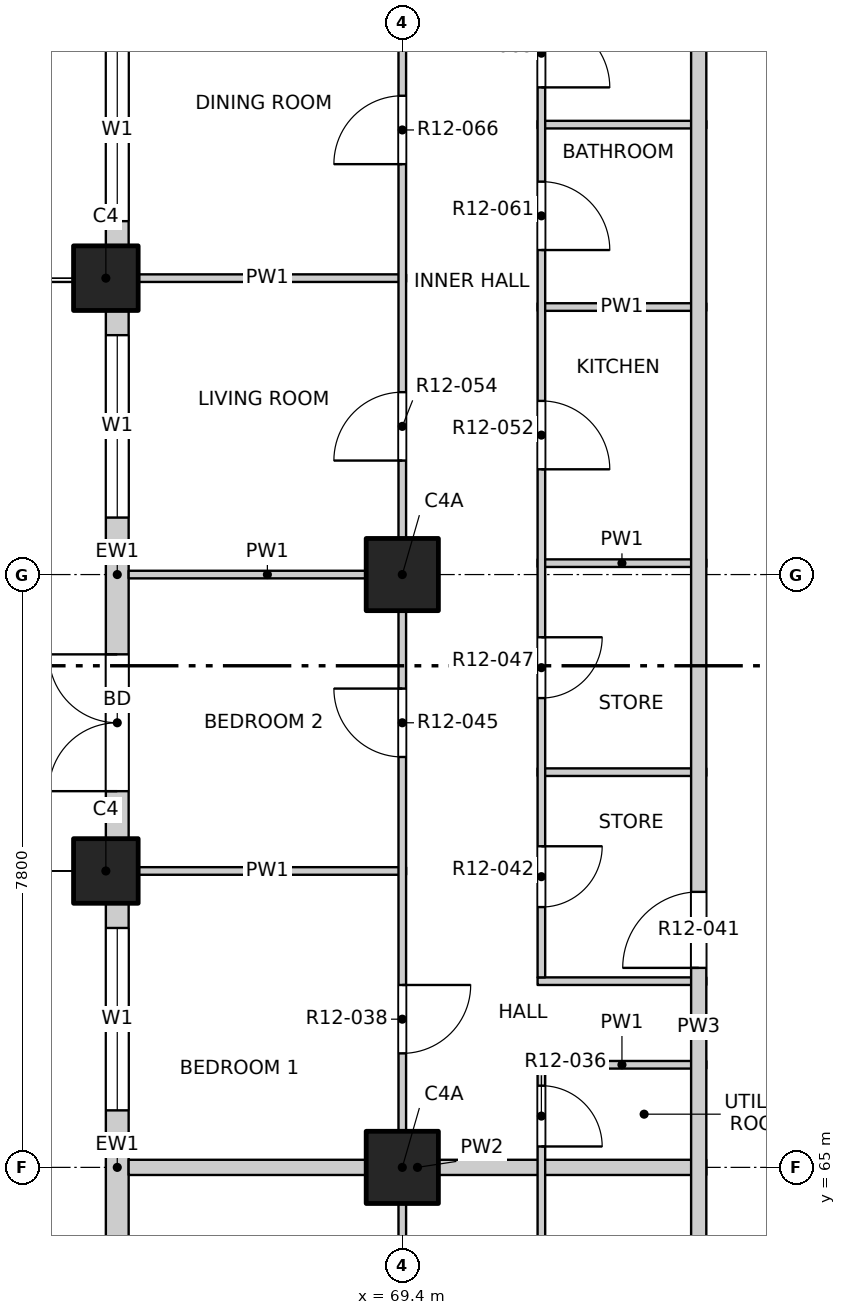
"""IFC4 building model, lengths in metres.
Left out: names, types, materials, properties, quantities, classifications, styles, units other than length and angle.
Written with IfcOpenShell. Run it as: python <this file> out.ifc"""

import sys

from ifc_helpers import new_model, si_unit, direction, frame, frame_2d, origin, origin_2d, place, context, subcontext, project, spatial, rectangle, extrude, element, fill, save


model = new_model("IFC4")
c1 = context("Model", 3, precision=1e-05, world=origin(), true_north=direction((0.0, 1.0)))
c2 = subcontext(c1, "Body", "Model", "MODEL_VIEW")
j1 = project(units=[si_unit("LENGTHUNIT", "METRE"), si_unit("PLANEANGLEUNIT", "RADIAN")], contexts=[c1])
p1 = place(None, origin())
s1 = spatial("IfcSite", under=j1, at=p1, CompositionType="ELEMENT")
p2 = place(p1, origin())
s2 = spatial("IfcBuilding", under=s1, at=p2, CompositionType="ELEMENT")
p3 = place(p2, frame((0.0, 0.0, 137.3)))
s3 = spatial("IfcBuildingStorey", under=s2, at=p3, CompositionType="ELEMENT", Elevation=137.3)
for number, where, z_axis, x_axis in (
    (1, (65.5, 68.9, -0.25), (0.0, 0.0, 1.0), (1.0, 0.0, 0.0)),
    (2, (65.5, 76.7, -0.25), (0.0, 0.0, 1.0), (1.0, 0.0, 0.0)),
):
    element("IfcColumn", number, at=place(p3, frame(where, z_axis=z_axis, x_axis=x_axis)), inside=s3, PredefinedType="COLUMN", context=c2, shape_type="SweptSolid", body=[
        extrude(rectangle(XDim=0.85, YDim=0.85, at=origin_2d()), origin(), (0.0, 0.0, 1.0), 3.4),
    ])
for number, where, z_axis, x_axis in (
    (3, (69.4, 65.0, -0.25), (0.0, 0.0, 1.0), (1.0, 0.0, 0.0)),
    (4, (69.4, 72.8, -0.25), (0.0, 0.0, 1.0), (1.0, 0.0, 0.0)),
):
    element("IfcColumn", number, at=place(p3, frame(where, z_axis=z_axis, x_axis=x_axis)), inside=s3, PredefinedType="COLUMN", context=c2, shape_type="SweptSolid", body=[
        extrude(rectangle(XDim=0.95, YDim=0.95, at=origin_2d()), origin(), (0.0, 0.0, 1.0), 3.4),
    ])
p4 = place(p3, frame((65.65, 61.525, 0.0), z_axis=(0.0, 0.0, 1.0), x_axis=(0.0, 1.0, 0.0)))
e5 = element("IfcWall", 5, at=p4, inside=s3, PredefinedType="SOLIDWALL", context=c2, shape_type="SweptSolid", body=[
    extrude(rectangle(XDim=6.95, YDim=0.3, at=frame_2d((3.475, 0.0))), origin(), (0.0, 0.0, 1.0), 2.7),
])
p5 = place(p4, frame((0.625, 0.0, 0.0)))
e6 = element("IfcOpeningElement", 6, at=p5, cuts=e5, PredefinedType="OPENING", context=c2, shape_type="SweptSolid", body=[
    extrude(rectangle(XDim=1.8, YDim=2.4, at=frame_2d((0.9, 1.2))), frame((0.0, 0.16, 0.0), z_axis=(0.0, -1.0, 0.0), x_axis=(1.0, 0.0, 0.0)), (0.0, 0.0, 1.0), 0.32),
])
p6 = place(p4, frame((4.225, 0.0, 0.9)))
e7 = element("IfcOpeningElement", 7, at=p6, cuts=e5, PredefinedType="OPENING", context=c2, shape_type="SweptSolid", body=[
    extrude(rectangle(XDim=2.4, YDim=1.8, at=frame_2d((1.2, 0.9))), frame((0.0, 0.16, 0.0), z_axis=(0.0, -1.0, 0.0), x_axis=(1.0, 0.0, 0.0)), (0.0, 0.0, 1.0), 0.32),
])
p7 = place(p3, frame((65.65, 69.325, 0.0), z_axis=(0.0, 0.0, 1.0), x_axis=(0.0, 1.0, 0.0)))
e8 = element("IfcWall", 8, at=p7, inside=s3, PredefinedType="SOLIDWALL", context=c2, shape_type="SweptSolid", body=[
    extrude(rectangle(XDim=6.95, YDim=0.3, at=frame_2d((3.475, 0.0))), origin(), (0.0, 0.0, 1.0), 2.7),
])
p8 = place(p7, frame((0.625, 0.0, 0.0)))
e9 = element("IfcOpeningElement", 9, at=p8, cuts=e8, PredefinedType="OPENING", context=c2, shape_type="SweptSolid", body=[
    extrude(rectangle(XDim=1.8, YDim=2.4, at=frame_2d((0.9, 1.2))), frame((0.0, 0.16, 0.0), z_axis=(0.0, -1.0, 0.0), x_axis=(1.0, 0.0, 0.0)), (0.0, 0.0, 1.0), 0.32),
])
p9 = place(p7, frame((4.225, 0.0, 0.9)))
e10 = element("IfcOpeningElement", 10, at=p9, cuts=e8, PredefinedType="OPENING", context=c2, shape_type="SweptSolid", body=[
    extrude(rectangle(XDim=2.4, YDim=1.8, at=frame_2d((1.2, 0.9))), frame((0.0, 0.16, 0.0), z_axis=(0.0, -1.0, 0.0), x_axis=(1.0, 0.0, 0.0)), (0.0, 0.0, 1.0), 0.32),
])
p10 = place(p3, frame((65.65, 77.125, 0.0), z_axis=(0.0, 0.0, 1.0), x_axis=(0.0, 1.0, 0.0)))
e11 = element("IfcWall", 11, at=p10, inside=s3, PredefinedType="SOLIDWALL", context=c2, shape_type="SweptSolid", body=[
    extrude(rectangle(XDim=3.475, YDim=0.3, at=frame_2d((1.738, 0.0))), origin(), (0.0, 0.0, 1.0), 2.7),
])
p11 = place(p10, frame((0.325, 0.0, 0.9)))
e12 = element("IfcOpeningElement", 12, at=p11, cuts=e11, PredefinedType="OPENING", context=c2, shape_type="SweptSolid", body=[
    extrude(rectangle(XDim=2.4, YDim=1.8, at=frame_2d((1.2, 0.9))), frame((0.0, 0.16, 0.0), z_axis=(0.0, -1.0, 0.0), x_axis=(1.0, 0.0, 0.0)), (0.0, 0.0, 1.0), 0.32),
])
p12 = place(p3, frame((65.8, 65.0, 0.0), z_axis=(0.0, 0.0, 1.0), x_axis=(1.0, 0.0, 0.0)))
e13 = element("IfcWall", 13, at=p12, inside=s3, PredefinedType="PARTITIONING", context=c2, shape_type="SweptSolid", body=[
    extrude(rectangle(XDim=7.6, YDim=0.2, at=frame_2d((3.8, 0.0))), origin(), (0.0, 0.0, 1.0), 3.15),
])
for number, where, z_axis, x_axis in (
    (14, (71.18, 66.35, 0.0), (0.0, 0.0, 1.0), (1.0, 0.0, 0.0)),
    (15, (71.18, 67.45, 0.0), (0.0, 0.0, 1.0), (1.0, 0.0, 0.0)),
):
    element("IfcWall", number, at=place(p3, frame(where, z_axis=z_axis, x_axis=x_axis)), inside=s3, PredefinedType="PARTITIONING", context=c2, shape_type="SweptSolid", body=[
        extrude(rectangle(XDim=2.22, YDim=0.1, at=frame_2d((1.11, 0.0))), origin(), (0.0, 0.0, 1.0), 3.15),
    ])
p13 = place(p3, frame((65.8, 68.9, 0.0), z_axis=(0.0, 0.0, 1.0), x_axis=(1.0, 0.0, 0.0)))
e16 = element("IfcWall", 16, at=p13, inside=s3, PredefinedType="PARTITIONING", context=c2, shape_type="SweptSolid", body=[
    extrude(rectangle(XDim=3.65, YDim=0.1, at=frame_2d((1.825, 0.0))), origin(), (0.0, 0.0, 1.0), 2.55),
])
p14 = place(p3, frame((71.18, 70.2, 0.0), z_axis=(0.0, 0.0, 1.0), x_axis=(1.0, 0.0, 0.0)))
e17 = element("IfcWall", 17, at=p14, inside=s3, PredefinedType="PARTITIONING", context=c2, shape_type="SweptSolid", body=[
    extrude(rectangle(XDim=2.22, YDim=0.1, at=frame_2d((1.11, 0.0))), origin(), (0.0, 0.0, 1.0), 3.15),
])
p15 = place(p3, frame((65.8, 72.8, 0.0), z_axis=(0.0, 0.0, 1.0), x_axis=(1.0, 0.0, 0.0)))
e18 = element("IfcWall", 18, at=p15, inside=s3, PredefinedType="PARTITIONING", context=c2, shape_type="SweptSolid", body=[
    extrude(rectangle(XDim=3.65, YDim=0.1, at=frame_2d((1.825, 0.0))), origin(), (0.0, 0.0, 1.0), 3.15),
])
for number, where, z_axis, x_axis in (
    (19, (71.18, 72.95, 0.0), (0.0, 0.0, 1.0), (1.0, 0.0, 0.0)),
    (20, (71.18, 76.32, 0.0), (0.0, 0.0, 1.0), (1.0, 0.0, 0.0)),
):
    element("IfcWall", number, at=place(p3, frame(where, z_axis=z_axis, x_axis=x_axis)), inside=s3, PredefinedType="PARTITIONING", context=c2, shape_type="SweptSolid", body=[
        extrude(rectangle(XDim=2.22, YDim=0.1, at=frame_2d((1.11, 0.0))), origin(), (0.0, 0.0, 1.0), 3.15),
    ])
p16 = place(p3, frame((65.8, 76.7, 0.0), z_axis=(0.0, 0.0, 1.0), x_axis=(1.0, 0.0, 0.0)))
e21 = element("IfcWall", 21, at=p16, inside=s3, PredefinedType="PARTITIONING", context=c2, shape_type="SweptSolid", body=[
    extrude(rectangle(XDim=3.65, YDim=0.1, at=frame_2d((1.825, 0.0))), origin(), (0.0, 0.0, 1.0), 2.55),
])
p17 = place(p3, frame((71.18, 78.72, 0.0), z_axis=(0.0, 0.0, 1.0), x_axis=(1.0, 0.0, 0.0)))
e22 = element("IfcWall", 22, at=p17, inside=s3, PredefinedType="PARTITIONING", context=c2, shape_type="SweptSolid", body=[
    extrude(rectangle(XDim=2.22, YDim=0.1, at=frame_2d((1.11, 0.0))), origin(), (0.0, 0.0, 1.0), 3.15),
])
p18 = place(p3, frame((69.4, 45.8, 0.0), z_axis=(0.0, 0.0, 1.0), x_axis=(0.0, 1.0, 0.0)))
e23 = element("IfcWall", 23, at=p18, inside=s3, PredefinedType="PARTITIONING", context=c2, shape_type="SweptSolid", body=[
    extrude(rectangle(XDim=38.4, YDim=0.1, at=frame_2d((19.2, 0.0))), origin(), (0.0, 0.0, 1.0), 3.15),
])
p19 = place(p18, frame((1.05, 0.0, 0.0)))
e24 = element("IfcOpeningElement", 24, at=p19, cuts=e23, PredefinedType="OPENING", context=c2, shape_type="SweptSolid", body=[
    extrude(rectangle(XDim=1.2, YDim=2.1, at=frame_2d((0.6, 1.05))), frame((0.0, 0.06, 0.0), z_axis=(0.0, -1.0, 0.0), x_axis=(1.0, 0.0, 0.0)), (0.0, 0.0, 1.0), 0.12),
])
p20 = place(p18, frame((5.1, 0.0, 0.0)))
e25 = element("IfcOpeningElement", 25, at=p20, cuts=e23, PredefinedType="OPENING", context=c2, shape_type="SweptSolid", body=[
    extrude(rectangle(XDim=0.9, YDim=2.1, at=frame_2d((0.45, 1.05))), frame((0.0, 0.06, 0.0), z_axis=(0.0, -1.0, 0.0), x_axis=(1.0, 0.0, 0.0)), (0.0, 0.0, 1.0), 0.12),
])
p21 = place(p18, frame((9.0, 0.0, 0.0)))
e26 = element("IfcOpeningElement", 26, at=p21, cuts=e23, PredefinedType="OPENING", context=c2, shape_type="SweptSolid", body=[
    extrude(rectangle(XDim=0.9, YDim=2.1, at=frame_2d((0.45, 1.05))), frame((0.0, 0.06, 0.0), z_axis=(0.0, -1.0, 0.0), x_axis=(1.0, 0.0, 0.0)), (0.0, 0.0, 1.0), 0.12),
])
p22 = place(p18, frame((12.9, 0.0, 0.0)))
e27 = element("IfcOpeningElement", 27, at=p22, cuts=e23, PredefinedType="OPENING", context=c2, shape_type="SweptSolid", body=[
    extrude(rectangle(XDim=0.9, YDim=2.1, at=frame_2d((0.45, 1.05))), frame((0.0, 0.06, 0.0), z_axis=(0.0, -1.0, 0.0), x_axis=(1.0, 0.0, 0.0)), (0.0, 0.0, 1.0), 0.12),
])
p23 = place(p18, frame((16.8, 0.0, 0.0)))
e28 = element("IfcOpeningElement", 28, at=p23, cuts=e23, PredefinedType="OPENING", context=c2, shape_type="SweptSolid", body=[
    extrude(rectangle(XDim=0.9, YDim=2.1, at=frame_2d((0.45, 1.05))), frame((0.0, 0.06, 0.0), z_axis=(0.0, -1.0, 0.0), x_axis=(1.0, 0.0, 0.0)), (0.0, 0.0, 1.0), 0.12),
])
p24 = place(p18, frame((20.7, 0.0, 0.0)))
e29 = element("IfcOpeningElement", 29, at=p24, cuts=e23, PredefinedType="OPENING", context=c2, shape_type="SweptSolid", body=[
    extrude(rectangle(XDim=0.9, YDim=2.1, at=frame_2d((0.45, 1.05))), frame((0.0, 0.06, 0.0), z_axis=(0.0, -1.0, 0.0), x_axis=(1.0, 0.0, 0.0)), (0.0, 0.0, 1.0), 0.12),
])
p25 = place(p18, frame((24.6, 0.0, 0.0)))
e30 = element("IfcOpeningElement", 30, at=p25, cuts=e23, PredefinedType="OPENING", context=c2, shape_type="SweptSolid", body=[
    extrude(rectangle(XDim=0.9, YDim=2.1, at=frame_2d((0.45, 1.05))), frame((0.0, 0.06, 0.0), z_axis=(0.0, -1.0, 0.0), x_axis=(1.0, 0.0, 0.0)), (0.0, 0.0, 1.0), 0.12),
])
p26 = place(p18, frame((28.5, 0.0, 0.0)))
e31 = element("IfcOpeningElement", 31, at=p26, cuts=e23, PredefinedType="OPENING", context=c2, shape_type="SweptSolid", body=[
    extrude(rectangle(XDim=0.9, YDim=2.1, at=frame_2d((0.45, 1.05))), frame((0.0, 0.06, 0.0), z_axis=(0.0, -1.0, 0.0), x_axis=(1.0, 0.0, 0.0)), (0.0, 0.0, 1.0), 0.12),
])
p27 = place(p18, frame((32.4, 0.0, 0.0)))
e32 = element("IfcOpeningElement", 32, at=p27, cuts=e23, PredefinedType="OPENING", context=c2, shape_type="SweptSolid", body=[
    extrude(rectangle(XDim=0.9, YDim=2.1, at=frame_2d((0.45, 1.05))), frame((0.0, 0.06, 0.0), z_axis=(0.0, -1.0, 0.0), x_axis=(1.0, 0.0, 0.0)), (0.0, 0.0, 1.0), 0.12),
])
p28 = place(p18, frame((36.15, 0.0, 0.0)))
e33 = element("IfcOpeningElement", 33, at=p28, cuts=e23, PredefinedType="OPENING", context=c2, shape_type="SweptSolid", body=[
    extrude(rectangle(XDim=1.2, YDim=2.1, at=frame_2d((0.6, 1.05))), frame((0.0, 0.06, 0.0), z_axis=(0.0, -1.0, 0.0), x_axis=(1.0, 0.0, 0.0)), (0.0, 0.0, 1.0), 0.12),
])
p29 = place(p3, frame((71.23, 56.35, 0.0), z_axis=(0.0, 0.0, 1.0), x_axis=(0.0, 1.0, 0.0)))
e34 = element("IfcWall", 34, at=p29, inside=s3, PredefinedType="PARTITIONING", context=c2, shape_type="SweptSolid", body=[
    extrude(rectangle(XDim=9.95, YDim=0.1, at=frame_2d((4.975, 0.0))), origin(), (0.0, 0.0, 1.0), 3.15),
])
p30 = place(p29, frame((0.99, 0.0, 0.0)))
e35 = element("IfcOpeningElement", 35, at=p30, cuts=e34, PredefinedType="OPENING", context=c2, shape_type="SweptSolid", body=[
    extrude(rectangle(XDim=0.8, YDim=2.1, at=frame_2d((0.4, 1.05))), frame((0.0, 0.06, 0.0), z_axis=(0.0, -1.0, 0.0), x_axis=(1.0, 0.0, 0.0)), (0.0, 0.0, 1.0), 0.12),
])
p31 = place(p29, frame((3.73, 0.0, 0.0)))
e36 = element("IfcOpeningElement", 36, at=p31, cuts=e34, PredefinedType="OPENING", context=c2, shape_type="SweptSolid", body=[
    extrude(rectangle(XDim=0.8, YDim=2.1, at=frame_2d((0.4, 1.05))), frame((0.0, 0.06, 0.0), z_axis=(0.0, -1.0, 0.0), x_axis=(1.0, 0.0, 0.0)), (0.0, 0.0, 1.0), 0.12),
])
p32 = place(p29, frame((6.59, 0.0, 0.0)))
e37 = element("IfcOpeningElement", 37, at=p32, cuts=e34, PredefinedType="OPENING", context=c2, shape_type="SweptSolid", body=[
    extrude(rectangle(XDim=0.9, YDim=2.1, at=frame_2d((0.45, 1.05))), frame((0.0, 0.06, 0.0), z_axis=(0.0, -1.0, 0.0), x_axis=(1.0, 0.0, 0.0)), (0.0, 0.0, 1.0), 0.12),
])
p33 = place(p29, frame((8.925, 0.0, 0.0)))
e38 = element("IfcOpeningElement", 38, at=p33, cuts=e34, PredefinedType="OPENING", context=c2, shape_type="SweptSolid", body=[
    extrude(rectangle(XDim=0.8, YDim=2.1, at=frame_2d((0.4, 1.05))), frame((0.0, 0.06, 0.0), z_axis=(0.0, -1.0, 0.0), x_axis=(1.0, 0.0, 0.0)), (0.0, 0.0, 1.0), 0.12),
])
p34 = place(p3, frame((71.23, 67.5, 0.0), z_axis=(0.0, 0.0, 1.0), x_axis=(0.0, 1.0, 0.0)))
e39 = element("IfcWall", 39, at=p34, inside=s3, PredefinedType="PARTITIONING", context=c2, shape_type="SweptSolid", body=[
    extrude(rectangle(XDim=13.05, YDim=0.1, at=frame_2d((6.525, 0.0))), origin(), (0.0, 0.0, 1.0), 3.15),
])
p35 = place(p34, frame((0.925, 0.0, 0.0)))
e40 = element("IfcOpeningElement", 40, at=p35, cuts=e39, PredefinedType="OPENING", context=c2, shape_type="SweptSolid", body=[
    extrude(rectangle(XDim=0.8, YDim=2.1, at=frame_2d((0.4, 1.05))), frame((0.0, 0.06, 0.0), z_axis=(0.0, -1.0, 0.0), x_axis=(1.0, 0.0, 0.0)), (0.0, 0.0, 1.0), 0.12),
])
p36 = place(p34, frame((3.675, 0.0, 0.0)))
e41 = element("IfcOpeningElement", 41, at=p36, cuts=e39, PredefinedType="OPENING", context=c2, shape_type="SweptSolid", body=[
    extrude(rectangle(XDim=0.8, YDim=2.1, at=frame_2d((0.4, 1.05))), frame((0.0, 0.06, 0.0), z_axis=(0.0, -1.0, 0.0), x_axis=(1.0, 0.0, 0.0)), (0.0, 0.0, 1.0), 0.12),
])
p37 = place(p34, frame((6.685, 0.0, 0.0)))
e42 = element("IfcOpeningElement", 42, at=p37, cuts=e39, PredefinedType="OPENING", context=c2, shape_type="SweptSolid", body=[
    extrude(rectangle(XDim=0.9, YDim=2.1, at=frame_2d((0.45, 1.05))), frame((0.0, 0.06, 0.0), z_axis=(0.0, -1.0, 0.0), x_axis=(1.0, 0.0, 0.0)), (0.0, 0.0, 1.0), 0.12),
])
p38 = place(p34, frame((9.57, 0.0, 0.0)))
e43 = element("IfcOpeningElement", 43, at=p38, cuts=e39, PredefinedType="OPENING", context=c2, shape_type="SweptSolid", body=[
    extrude(rectangle(XDim=0.9, YDim=2.1, at=frame_2d((0.45, 1.05))), frame((0.0, 0.06, 0.0), z_axis=(0.0, -1.0, 0.0), x_axis=(1.0, 0.0, 0.0)), (0.0, 0.0, 1.0), 0.12),
])
p39 = place(p34, frame((11.71, 0.0, 0.0)))
e44 = element("IfcOpeningElement", 44, at=p39, cuts=e39, PredefinedType="OPENING", context=c2, shape_type="SweptSolid", body=[
    extrude(rectangle(XDim=0.9, YDim=2.1, at=frame_2d((0.45, 1.05))), frame((0.0, 0.06, 0.0), z_axis=(0.0, -1.0, 0.0), x_axis=(1.0, 0.0, 0.0)), (0.0, 0.0, 1.0), 0.12),
])
p40 = place(p3, frame((73.3, 49.5, 0.0), z_axis=(0.0, 0.0, 1.0), x_axis=(0.0, 1.0, 0.0)))
e45 = element("IfcWall", 45, at=p40, inside=s3, PredefinedType="PARTITIONING", context=c2, shape_type="SweptSolid", body=[
    extrude(rectangle(XDim=34.7, YDim=0.2, at=frame_2d((17.35, 0.0))), origin(), (0.0, 0.0, 1.0), 3.15),
])
p41 = place(p40, frame((6.975, 0.0, 0.0)))
e46 = element("IfcOpeningElement", 46, at=p41, cuts=e45, PredefinedType="OPENING", context=c2, shape_type="SweptSolid", body=[
    extrude(rectangle(XDim=1.0, YDim=2.1, at=frame_2d((0.5, 1.05))), frame((0.0, 0.11, 0.0), z_axis=(0.0, -1.0, 0.0), x_axis=(1.0, 0.0, 0.0)), (0.0, 0.0, 1.0), 0.22),
])
p42 = place(p40, frame((18.125, 0.0, 0.0)))
e47 = element("IfcOpeningElement", 47, at=p42, cuts=e45, PredefinedType="OPENING", context=c2, shape_type="SweptSolid", body=[
    extrude(rectangle(XDim=1.0, YDim=2.1, at=frame_2d((0.5, 1.05))), frame((0.0, 0.11, 0.0), z_axis=(0.0, -1.0, 0.0), x_axis=(1.0, 0.0, 0.0)), (0.0, 0.0, 1.0), 0.22),
])
p43 = place(p6, origin())
e48 = element("IfcWindow", 48, at=p43, inside=s3, PartitioningType="DOUBLE_PANEL_VERTICAL", PredefinedType="WINDOW", context=c2, shape_type="SweptSolid", body=[
    extrude(rectangle(XDim=2.4, YDim=1.8, at=frame_2d((1.2, 0.9))), frame((0.0, 0.03, 0.0), z_axis=(0.0, -1.0, 0.0), x_axis=(1.0, 0.0, 0.0)), (0.0, 0.0, 1.0), 0.06),
])
fill(e7, e48)
p44 = place(p8, origin())
e49 = element("IfcDoor", 49, at=p44, inside=s3, OperationType="DOUBLE_DOOR_SINGLE_SWING", PredefinedType="DOOR", context=c2, shape_type="SweptSolid", body=[
    extrude(rectangle(XDim=1.8, YDim=2.4, at=frame_2d((0.9, 1.2))), frame((0.0, 0.025, 0.0), z_axis=(0.0, -1.0, 0.0), x_axis=(1.0, 0.0, 0.0)), (0.0, 0.0, 1.0), 0.05),
])
fill(e9, e49)
p45 = place(p9, origin())
e50 = element("IfcWindow", 50, at=p45, inside=s3, PartitioningType="DOUBLE_PANEL_VERTICAL", PredefinedType="WINDOW", context=c2, shape_type="SweptSolid", body=[
    extrude(rectangle(XDim=2.4, YDim=1.8, at=frame_2d((1.2, 0.9))), frame((0.0, 0.03, 0.0), z_axis=(0.0, -1.0, 0.0), x_axis=(1.0, 0.0, 0.0)), (0.0, 0.0, 1.0), 0.06),
])
fill(e10, e50)
p46 = place(p11, origin())
e51 = element("IfcWindow", 51, at=p46, inside=s3, PartitioningType="DOUBLE_PANEL_VERTICAL", PredefinedType="WINDOW", context=c2, shape_type="SweptSolid", body=[
    extrude(rectangle(XDim=2.4, YDim=1.8, at=frame_2d((1.2, 0.9))), frame((0.0, 0.03, 0.0), z_axis=(0.0, -1.0, 0.0), x_axis=(1.0, 0.0, 0.0)), (0.0, 0.0, 1.0), 0.06),
])
fill(e12, e51)
p47 = place(p33, origin())
e52 = element("IfcDoor", 52, at=p47, inside=s3, OperationType="SINGLE_SWING_RIGHT", PredefinedType="DOOR", context=c2, shape_type="SweptSolid", body=[
    extrude(rectangle(XDim=0.8, YDim=2.1, at=frame_2d((0.4, 1.05))), frame((0.0, 0.025, 0.0), z_axis=(0.0, -1.0, 0.0), x_axis=(1.0, 0.0, 0.0)), (0.0, 0.0, 1.0), 0.05),
])
fill(e38, e52)
p48 = place(p24, origin())
e53 = element("IfcDoor", 53, at=p48, inside=s3, OperationType="SINGLE_SWING_LEFT", PredefinedType="DOOR", context=c2, shape_type="SweptSolid", body=[
    extrude(rectangle(XDim=0.9, YDim=2.1, at=frame_2d((0.45, 1.05))), frame((0.0, 0.025, 0.0), z_axis=(0.0, -1.0, 0.0), x_axis=(1.0, 0.0, 0.0)), (0.0, 0.0, 1.0), 0.05),
])
fill(e29, e53)
p49 = place(p42, origin())
e54 = element("IfcDoor", 54, at=p49, inside=s3, OperationType="SINGLE_SWING_RIGHT", PredefinedType="DOOR", context=c2, shape_type="SweptSolid", body=[
    extrude(rectangle(XDim=1.0, YDim=2.1, at=frame_2d((0.5, 1.05))), frame((0.0, 0.025, 0.0), z_axis=(0.0, -1.0, 0.0), x_axis=(1.0, 0.0, 0.0)), (0.0, 0.0, 1.0), 0.05),
])
fill(e47, e54)
p50 = place(p35, origin())
e55 = element("IfcDoor", 55, at=p50, inside=s3, OperationType="SINGLE_SWING_LEFT", PredefinedType="DOOR", context=c2, shape_type="SweptSolid", body=[
    extrude(rectangle(XDim=0.8, YDim=2.1, at=frame_2d((0.4, 1.05))), frame((0.0, 0.025, 0.0), z_axis=(0.0, -1.0, 0.0), x_axis=(1.0, 0.0, 0.0)), (0.0, 0.0, 1.0), 0.05),
])
fill(e40, e55)
p51 = place(p25, origin())
e56 = element("IfcDoor", 56, at=p51, inside=s3, OperationType="SINGLE_SWING_RIGHT", PredefinedType="DOOR", context=c2, shape_type="SweptSolid", body=[
    extrude(rectangle(XDim=0.9, YDim=2.1, at=frame_2d((0.45, 1.05))), frame((0.0, 0.025, 0.0), z_axis=(0.0, -1.0, 0.0), x_axis=(1.0, 0.0, 0.0)), (0.0, 0.0, 1.0), 0.05),
])
fill(e30, e56)
p52 = place(p36, origin())
e57 = element("IfcDoor", 57, at=p52, inside=s3, OperationType="SINGLE_SWING_LEFT", PredefinedType="DOOR", context=c2, shape_type="SweptSolid", body=[
    extrude(rectangle(XDim=0.8, YDim=2.1, at=frame_2d((0.4, 1.05))), frame((0.0, 0.025, 0.0), z_axis=(0.0, -1.0, 0.0), x_axis=(1.0, 0.0, 0.0)), (0.0, 0.0, 1.0), 0.05),
])
fill(e41, e57)
p53 = place(p37, origin())
e58 = element("IfcDoor", 58, at=p53, inside=s3, OperationType="SINGLE_SWING_RIGHT", PredefinedType="DOOR", context=c2, shape_type="SweptSolid", body=[
    extrude(rectangle(XDim=0.9, YDim=2.1, at=frame_2d((0.45, 1.05))), frame((0.0, 0.025, 0.0), z_axis=(0.0, -1.0, 0.0), x_axis=(1.0, 0.0, 0.0)), (0.0, 0.0, 1.0), 0.05),
])
fill(e42, e58)
p54 = place(p26, origin())
e59 = element("IfcDoor", 59, at=p54, inside=s3, OperationType="SINGLE_SWING_LEFT", PredefinedType="DOOR", context=c2, shape_type="SweptSolid", body=[
    extrude(rectangle(XDim=0.9, YDim=2.1, at=frame_2d((0.45, 1.05))), frame((0.0, 0.025, 0.0), z_axis=(0.0, -1.0, 0.0), x_axis=(1.0, 0.0, 0.0)), (0.0, 0.0, 1.0), 0.05),
])
fill(e31, e59)
p55 = place(p38, origin())
e60 = element("IfcDoor", 60, at=p55, inside=s3, OperationType="SINGLE_SWING_RIGHT", PredefinedType="DOOR", context=c2, shape_type="SweptSolid", body=[
    extrude(rectangle(XDim=0.9, YDim=2.1, at=frame_2d((0.45, 1.05))), frame((0.0, 0.025, 0.0), z_axis=(0.0, -1.0, 0.0), x_axis=(1.0, 0.0, 0.0)), (0.0, 0.0, 1.0), 0.05),
])
fill(e43, e60)
p56 = place(p27, origin())
e61 = element("IfcDoor", 61, at=p56, inside=s3, OperationType="SINGLE_SWING_LEFT", PredefinedType="DOOR", context=c2, shape_type="SweptSolid", body=[
    extrude(rectangle(XDim=0.9, YDim=2.1, at=frame_2d((0.45, 1.05))), frame((0.0, 0.025, 0.0), z_axis=(0.0, -1.0, 0.0), x_axis=(1.0, 0.0, 0.0)), (0.0, 0.0, 1.0), 0.05),
])
fill(e32, e61)
p57 = place(p39, origin())
e62 = element("IfcDoor", 62, at=p57, inside=s3, OperationType="SINGLE_SWING_RIGHT", PredefinedType="DOOR", context=c2, shape_type="SweptSolid", body=[
    extrude(rectangle(XDim=0.9, YDim=2.1, at=frame_2d((0.45, 1.05))), frame((0.0, 0.025, 0.0), z_axis=(0.0, -1.0, 0.0), x_axis=(1.0, 0.0, 0.0)), (0.0, 0.0, 1.0), 0.05),
])
fill(e44, e62)
save(model, sys.argv[1])
